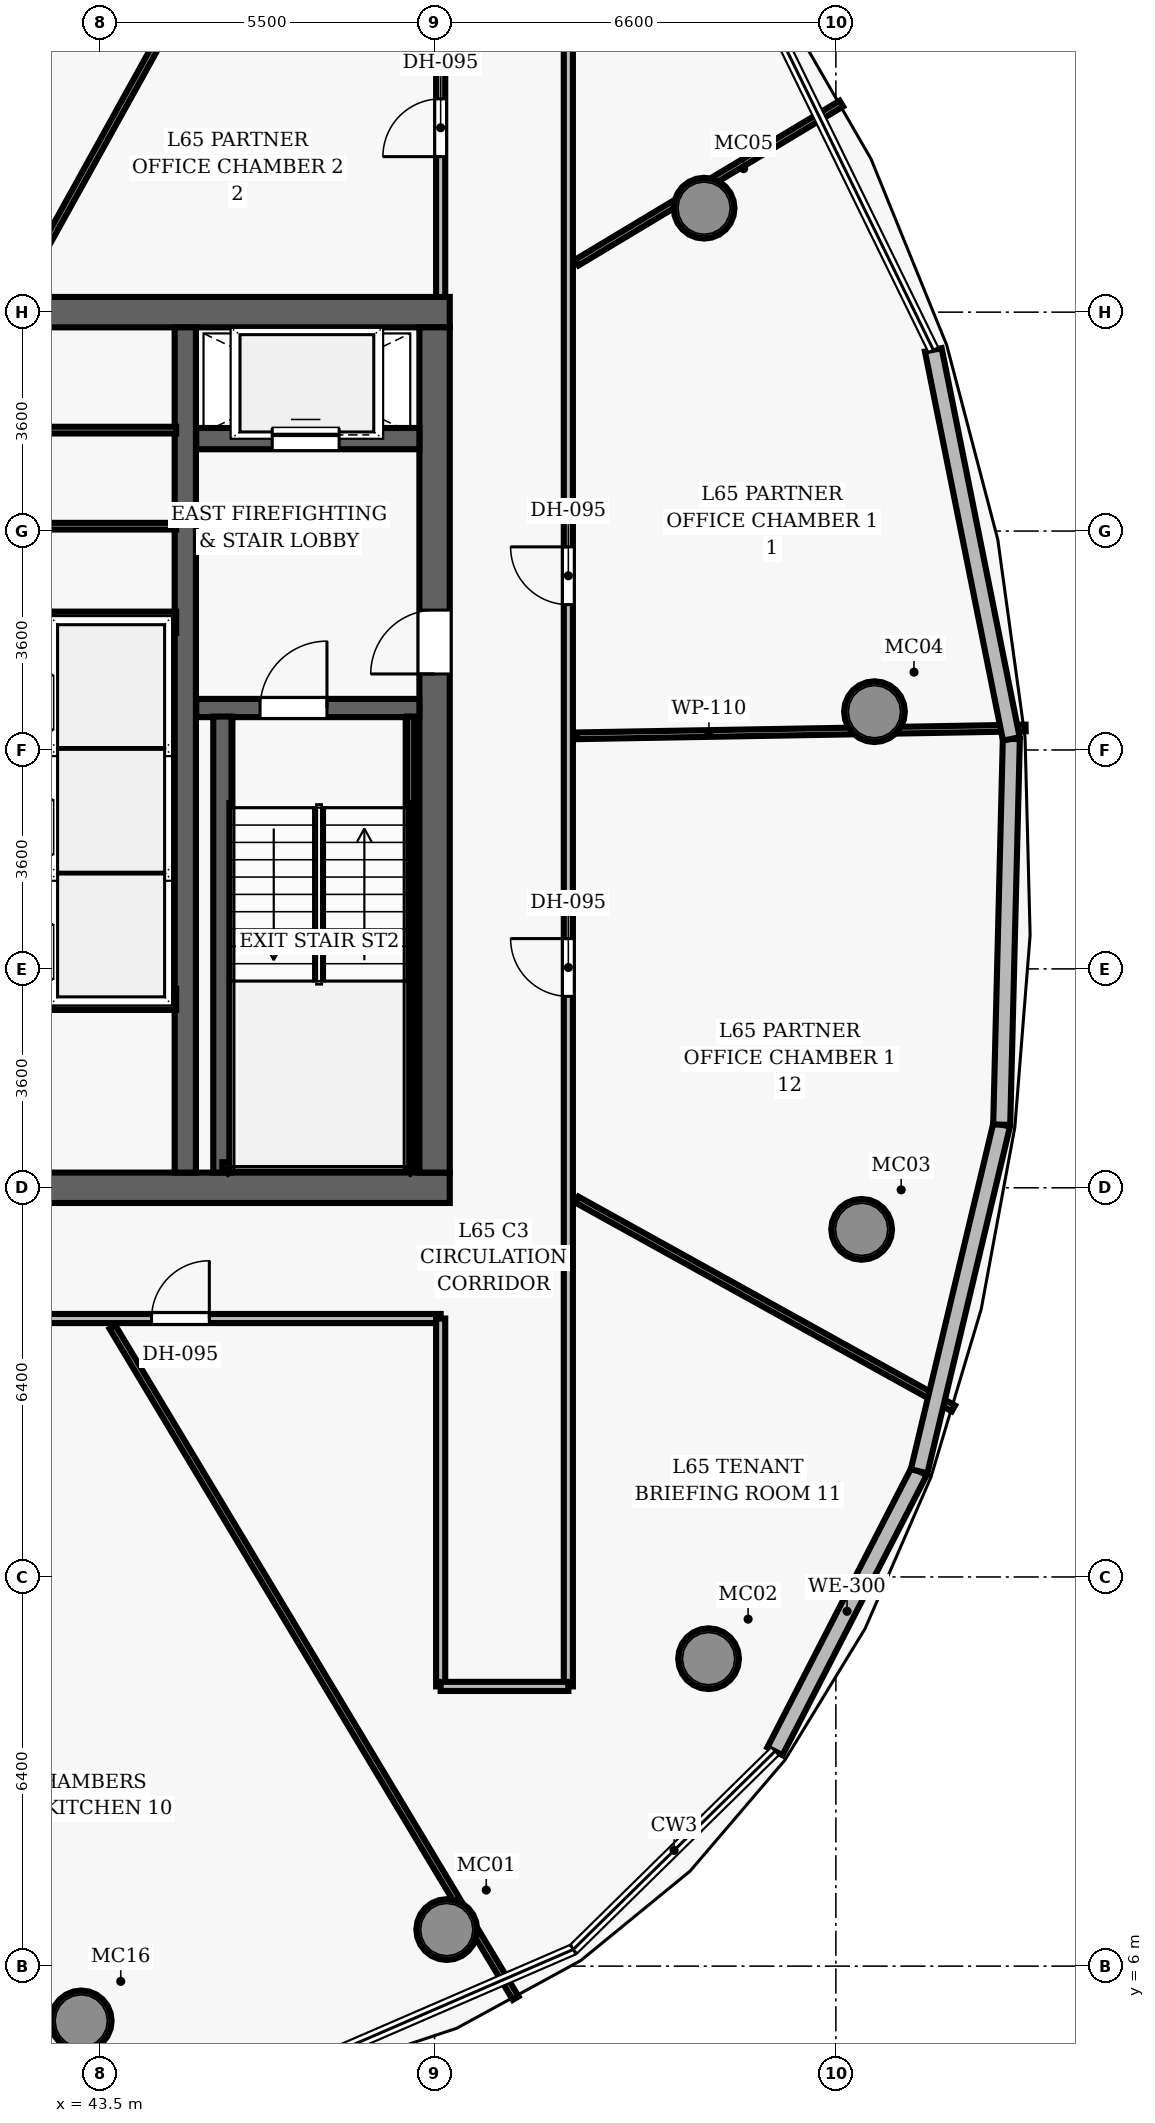
"""IFC4 building model, lengths in metres.
Left out: names, types, materials, properties, quantities, classifications, styles, units other than length and angle.
Written with IfcOpenShell. Run it as: python <this file> out.ifc"""

import sys

from ifc_helpers import new_model, si_unit, direction, frame, frame_2d, origin, origin_2d, place, context, subcontext, project, spatial, rectangle, hollow_circle, extrude, element, fill, save


model = new_model("IFC4")
c1 = context("Model", 3, precision=1e-05, world=origin(), true_north=direction((0.0, 1.0)))
c2 = subcontext(c1, "Body", "Model", "MODEL_VIEW")
j1 = project(units=[si_unit("LENGTHUNIT", "METRE"), si_unit("PLANEANGLEUNIT", "RADIAN")], contexts=[c1])
p1 = place(None, origin())
s1 = spatial("IfcSite", under=j1, at=p1, CompositionType="ELEMENT")
p2 = place(p1, origin())
s2 = spatial("IfcBuilding", under=s1, at=p2, CompositionType="ELEMENT")
p3 = place(p2, frame((0.0, 0.0, 257.45)))
s3 = spatial("IfcBuildingStorey", under=s2, at=p3, CompositionType="ELEMENT", Elevation=257.45)
p4 = place(p3, frame((26.75, 18.8, 0.0), z_axis=(0.0, 0.0, 1.0), x_axis=(1.0, 0.0, 0.0)))
e1 = element("IfcWall", 1, at=p4, inside=s3, PredefinedType="SHEAR", context=c2, shape_type="SweptSolid", body=[
    extrude(rectangle(XDim=22.5, YDim=0.5, at=frame_2d((11.25, 0.0))), origin(), (0.0, 0.0, 1.0), 3.85),
])
p5 = place(p4, frame((14.47, 0.0, 0.0)))
e2 = element("IfcOpeningElement", 2, at=p5, cuts=e1, PredefinedType="OPENING", context=c2, shape_type="SweptSolid", body=[
    extrude(rectangle(XDim=1.05, YDim=2.15, at=frame_2d((0.525, 1.075))), frame((0.0, 0.26, 0.0), z_axis=(0.0, -1.0, 0.0), x_axis=(1.0, 0.0, 0.0)), (0.0, 0.0, 1.0), 0.52),
])
p6 = place(p3, frame((26.75, 33.2, 0.0), z_axis=(0.0, 0.0, 1.0), x_axis=(1.0, 0.0, 0.0)))
e3 = element("IfcWall", 3, at=p6, inside=s3, PredefinedType="SHEAR", context=c2, shape_type="SweptSolid", body=[
    extrude(rectangle(XDim=22.5, YDim=0.5, at=frame_2d((11.25, 0.0))), origin(), (0.0, 0.0, 1.0), 3.85),
])
p7 = place(p3, frame((49.0, 19.05, 0.0), z_axis=(0.0, 0.0, 1.0), x_axis=(0.0, 1.0, 0.0)))
e4 = element("IfcWall", 4, at=p7, inside=s3, PredefinedType="SHEAR", context=c2, shape_type="SweptSolid", body=[
    extrude(rectangle(XDim=13.9, YDim=0.5, at=frame_2d((6.95, 0.0))), origin(), (0.0, 0.0, 1.0), 3.85),
])
p8 = place(p7, frame((8.2, 0.0, 0.0)))
e5 = element("IfcOpeningElement", 5, at=p8, cuts=e4, PredefinedType="OPENING", context=c2, shape_type="SweptSolid", body=[
    extrude(rectangle(XDim=1.05, YDim=2.15, at=frame_2d((0.525, 1.075))), frame((0.0, 0.26, 0.0), z_axis=(0.0, -1.0, 0.0), x_axis=(1.0, 0.0, 0.0)), (0.0, 0.0, 1.0), 0.52),
])
p9 = place(p3, frame((44.9, 19.05, 0.0), z_axis=(0.0, 0.0, 1.0), x_axis=(0.0, 1.0, 0.0)))
e6 = element("IfcWall", 6, at=p9, inside=s3, PredefinedType="SHEAR", context=c2, shape_type="SweptSolid", body=[
    extrude(rectangle(XDim=13.9, YDim=0.35, at=frame_2d((6.95, 0.0))), origin(), (0.0, 0.0, 1.0), 3.85),
])
for number, where, z_axis, x_axis in (
    (7, (49.2, 6.601, 0.0), (0.0, 0.0, 1.0), (1.0, 0.0, 0.0)),
    (8, (53.506, 11.056, 0.0), (0.0, 0.0, 1.0), (1.0, 0.0, 0.0)),
    (9, (56.024, 18.116, 0.0), (0.0, 0.0, 1.0), (1.0, 0.0, 0.0)),
    (10, (56.235, 26.629, 0.0), (0.0, 0.0, 1.0), (1.0, 0.0, 0.0)),
    (11, (53.433, 34.91, 0.0), (0.0, 0.0, 1.0), (1.0, 0.0, 0.0)),
    (12, (43.188, 5.099, 0.0), (0.0, 0.0, 1.0), (1.0, 0.0, 0.0)),
):
    element("IfcColumn", number, at=place(p3, frame(where, z_axis=z_axis, x_axis=x_axis)), inside=s3, PredefinedType="COLUMN", context=c2, shape_type="SweptSolid", body=[
        extrude(hollow_circle(Radius=0.5, WallThickness=0.045, at=origin_2d()), origin(), (0.0, 0.0, 1.0), 3.85),
    ])
p10 = place(p3, frame((45.08, 26.69, 0.0), z_axis=(0.0, 0.0, 1.0), x_axis=(1.0, 0.0, 0.0)))
e13 = element("IfcWall", 13, at=p10, inside=s3, PredefinedType="SHEAR", context=c2, shape_type="SweptSolid", body=[
    extrude(rectangle(XDim=3.67, YDim=0.3, at=frame_2d((1.835, 0.0))), origin(), (0.0, 0.0, 1.0), 3.85),
])
p11 = place(p10, frame((1.05, 0.0, 0.0)))
e14 = element("IfcOpeningElement", 14, at=p11, cuts=e13, PredefinedType="OPENING", context=c2, shape_type="SweptSolid", body=[
    extrude(rectangle(XDim=1.1, YDim=2.15, at=frame_2d((0.55, 1.075))), frame((0.0, 0.16, 0.0), z_axis=(0.0, -1.0, 0.0), x_axis=(1.0, 0.0, 0.0)), (0.0, 0.0, 1.0), 0.32),
])
p12 = place(p3, frame((45.51, 19.05, 0.0), z_axis=(0.0, 0.0, 1.0), x_axis=(0.0, 1.0, 0.0)))
e15 = element("IfcWall", 15, at=p12, inside=s3, PredefinedType="SHEAR", context=c2, shape_type="SweptSolid", body=[
    extrude(rectangle(XDim=7.5, YDim=0.3, at=frame_2d((3.75, 0.0))), origin(), (0.0, 0.0, 1.0), 3.85),
])
p13 = place(p3, frame((48.605, 19.1, 0.0), z_axis=(0.0, 0.0, 1.0), x_axis=(0.0, 1.0, 0.0)))
e16 = element("IfcWall", 16, at=p13, inside=s3, PredefinedType="SHEAR", context=c2, shape_type="SweptSolid", body=[
    extrude(rectangle(XDim=7.45, YDim=0.12, at=frame_2d((3.725, 0.0))), origin(), (0.0, 0.0, 1.0), 3.85),
])
p14 = place(p3, frame((45.51, 19.16, 0.0), z_axis=(0.0, 0.0, 1.0), x_axis=(1.0, 0.0, 0.0)))
e17 = element("IfcWall", 17, at=p14, inside=s3, PredefinedType="SHEAR", context=c2, shape_type="SweptSolid", body=[
    extrude(rectangle(XDim=3.095, YDim=0.12, at=frame_2d((1.547, 0.0))), origin(), (0.0, 0.0, 1.0), 3.85),
])
p15 = place(p3, frame((45.08, 31.12, 0.0), z_axis=(0.0, 0.0, 1.0), x_axis=(1.0, 0.0, 0.0)))
e18 = element("IfcWall", 18, at=p15, inside=s3, PredefinedType="SHEAR", context=c2, shape_type="SweptSolid", body=[
    extrude(rectangle(XDim=3.67, YDim=0.35, at=frame_2d((1.835, 0.0))), origin(), (0.0, 0.0, 1.0), 3.04),
])
p16 = place(p15, frame((1.25, 0.0, 0.0)))
e19 = element("IfcOpeningElement", 19, at=p16, cuts=e18, PredefinedType="OPENING", context=c2, shape_type="SweptSolid", body=[
    extrude(rectangle(XDim=1.1, YDim=2.15, at=frame_2d((0.55, 1.075))), frame((0.0, 0.185, 0.0), z_axis=(0.0, -1.0, 0.0), x_axis=(1.0, 0.0, 0.0)), (0.0, 0.0, 1.0), 0.37),
])
p17 = place(p3, frame((42.55, 21.73, 0.0), z_axis=(0.0, 0.0, 1.0), x_axis=(0.0, 1.0, 0.0)))
e20 = element("IfcWall", 20, at=p17, inside=s3, PredefinedType="SHEAR", context=c2, shape_type="SweptSolid", body=[
    extrude(rectangle(XDim=6.54, YDim=0.35, at=frame_2d((3.27, 0.0))), origin(), (0.0, 0.0, 1.0), 3.04),
])
p18 = place(p17, frame((0.5, 0.0, 0.0)))
e21 = element("IfcOpeningElement", 21, at=p18, cuts=e20, PredefinedType="OPENING", context=c2, shape_type="SweptSolid", body=[
    extrude(rectangle(XDim=0.9, YDim=2.15, at=frame_2d((0.45, 1.075))), frame((0.0, 0.185, 0.0), z_axis=(0.0, -1.0, 0.0), x_axis=(1.0, 0.0, 0.0)), (0.0, 0.0, 1.0), 0.37),
])
p19 = place(p17, frame((2.55, 0.0, 0.0)))
e22 = element("IfcOpeningElement", 22, at=p19, cuts=e20, PredefinedType="OPENING", context=c2, shape_type="SweptSolid", body=[
    extrude(rectangle(XDim=0.9, YDim=2.15, at=frame_2d((0.45, 1.075))), frame((0.0, 0.185, 0.0), z_axis=(0.0, -1.0, 0.0), x_axis=(1.0, 0.0, 0.0)), (0.0, 0.0, 1.0), 0.37),
])
p20 = place(p17, frame((4.6, 0.0, 0.0)))
e23 = element("IfcOpeningElement", 23, at=p20, cuts=e20, PredefinedType="OPENING", context=c2, shape_type="SweptSolid", body=[
    extrude(rectangle(XDim=0.9, YDim=2.15, at=frame_2d((0.45, 1.075))), frame((0.0, 0.185, 0.0), z_axis=(0.0, -1.0, 0.0), x_axis=(1.0, 0.0, 0.0)), (0.0, 0.0, 1.0), 0.37),
])
for number, where, z_axis, x_axis in (
    (24, (42.72, 21.9, 0.0), (0.0, 0.0, 1.0), (1.0, 0.0, 0.0)),
    (25, (42.72, 28.1, 0.0), (0.0, 0.0, 1.0), (1.0, 0.0, 0.0)),
):
    element("IfcWall", number, at=place(p3, frame(where, z_axis=z_axis, x_axis=x_axis)), inside=s3, PredefinedType="SHEAR", context=c2, shape_type="SweptSolid", body=[
        extrude(rectangle(XDim=2.03, YDim=0.35, at=frame_2d((1.015, 0.0))), origin(), (0.0, 0.0, 1.0), 3.04),
    ])
for number, where, z_axis, x_axis in (
    (26, (42.55, 29.68, 0.0), (0.0, 0.0, 1.0), (1.0, 0.0, 0.0)),
    (27, (42.55, 31.26, 0.0), (0.0, 0.0, 1.0), (1.0, 0.0, 0.0)),
):
    element("IfcWall", number, at=place(p3, frame(where, z_axis=z_axis, x_axis=x_axis)), inside=s3, PredefinedType="PARTITIONING", context=c2, shape_type="SweptSolid", body=[
        extrude(rectangle(XDim=2.2, YDim=0.11, at=frame_2d((1.1, 0.0))), origin(), (0.0, 0.0, 1.0), 3.04),
    ])
p21 = place(p3, frame((26.9, 16.65, 0.0), z_axis=(0.0, 0.0, 1.0), x_axis=(1.0, 0.0, 0.0)))
e28 = element("IfcWall", 28, at=p21, inside=s3, PredefinedType="PARTITIONING", context=c2, shape_type="SweptSolid", body=[
    extrude(rectangle(XDim=22.2, YDim=0.15, at=frame_2d((11.1, 0.0))), origin(), (0.0, 0.0, 1.0), 3.04),
])
p22 = place(p21, frame((4.135, 0.0, 0.0)))
e29 = element("IfcOpeningElement", 29, at=p22, cuts=e28, PredefinedType="OPENING", context=c2, shape_type="SweptSolid", body=[
    extrude(rectangle(XDim=0.95, YDim=2.15, at=frame_2d((0.475, 1.075))), frame((0.0, 0.085, 0.0), z_axis=(0.0, -1.0, 0.0), x_axis=(1.0, 0.0, 0.0)), (0.0, 0.0, 1.0), 0.17),
])
p23 = place(p21, frame((9.584, 0.0, 0.0)))
e30 = element("IfcOpeningElement", 30, at=p23, cuts=e28, PredefinedType="OPENING", context=c2, shape_type="SweptSolid", body=[
    extrude(rectangle(XDim=0.95, YDim=2.15, at=frame_2d((0.475, 1.075))), frame((0.0, 0.085, 0.0), z_axis=(0.0, -1.0, 0.0), x_axis=(1.0, 0.0, 0.0)), (0.0, 0.0, 1.0), 0.17),
])
p24 = place(p21, frame((14.473, 0.0, 0.0)))
e31 = element("IfcOpeningElement", 31, at=p24, cuts=e28, PredefinedType="OPENING", context=c2, shape_type="SweptSolid", body=[
    extrude(rectangle(XDim=0.95, YDim=2.15, at=frame_2d((0.475, 1.075))), frame((0.0, 0.085, 0.0), z_axis=(0.0, -1.0, 0.0), x_axis=(1.0, 0.0, 0.0)), (0.0, 0.0, 1.0), 0.17),
])
p25 = place(p21, frame((17.445, 0.0, 0.0)))
e32 = element("IfcOpeningElement", 32, at=p25, cuts=e28, PredefinedType="OPENING", context=c2, shape_type="SweptSolid", body=[
    extrude(rectangle(XDim=0.95, YDim=2.15, at=frame_2d((0.475, 1.075))), frame((0.0, 0.085, 0.0), z_axis=(0.0, -1.0, 0.0), x_axis=(1.0, 0.0, 0.0)), (0.0, 0.0, 1.0), 0.17),
])
p26 = place(p3, frame((51.2, 10.6, 0.0), z_axis=(0.0, 0.0, 1.0), x_axis=(0.0, 1.0, 0.0)))
e33 = element("IfcWall", 33, at=p26, inside=s3, PredefinedType="PARTITIONING", context=c2, shape_type="SweptSolid", body=[
    extrude(rectangle(XDim=30.8, YDim=0.15, at=frame_2d((15.4, 0.0))), origin(), (0.0, 0.0, 1.0), 3.04),
])
p27 = place(p26, frame((17.79, 0.0, 0.0)))
e34 = element("IfcOpeningElement", 34, at=p27, cuts=e33, PredefinedType="OPENING", context=c2, shape_type="SweptSolid", body=[
    extrude(rectangle(XDim=0.95, YDim=2.15, at=frame_2d((0.475, 1.075))), frame((0.0, 0.085, 0.0), z_axis=(0.0, -1.0, 0.0), x_axis=(1.0, 0.0, 0.0)), (0.0, 0.0, 1.0), 0.17),
])
p28 = place(p26, frame((11.348, 0.0, 0.0)))
e35 = element("IfcOpeningElement", 35, at=p28, cuts=e33, PredefinedType="OPENING", context=c2, shape_type="SweptSolid", body=[
    extrude(rectangle(XDim=0.95, YDim=2.15, at=frame_2d((0.475, 1.075))), frame((0.0, 0.085, 0.0), z_axis=(0.0, -1.0, 0.0), x_axis=(1.0, 0.0, 0.0)), (0.0, 0.0, 1.0), 0.17),
])
p29 = place(p3, frame((49.1, 10.6, 0.0), z_axis=(0.0, 0.0, 1.0), x_axis=(0.0, 1.0, 0.0)))
e36 = element("IfcWall", 36, at=p29, inside=s3, PredefinedType="PARTITIONING", context=c2, shape_type="SweptSolid", body=[
    extrude(rectangle(XDim=6.05, YDim=0.15, at=frame_2d((3.025, 0.0))), origin(), (0.0, 0.0, 1.0), 3.04),
])
p30 = place(p3, frame((49.1, 33.45, 0.0), z_axis=(0.0, 0.0, 1.0), x_axis=(0.0, 1.0, 0.0)))
e37 = element("IfcWall", 37, at=p30, inside=s3, PredefinedType="PARTITIONING", context=c2, shape_type="SweptSolid", body=[
    extrude(rectangle(XDim=7.95, YDim=0.15, at=frame_2d((3.975, 0.0))), origin(), (0.0, 0.0, 1.0), 3.04),
])
p31 = place(p30, frame((2.308, 0.0, 0.0)))
e38 = element("IfcOpeningElement", 38, at=p31, cuts=e37, PredefinedType="OPENING", context=c2, shape_type="SweptSolid", body=[
    extrude(rectangle(XDim=0.95, YDim=2.15, at=frame_2d((0.475, 1.075))), frame((0.0, 0.085, 0.0), z_axis=(0.0, -1.0, 0.0), x_axis=(1.0, 0.0, 0.0)), (0.0, 0.0, 1.0), 0.17),
])
p32 = place(p3, frame((49.1, 10.6, 0.0), z_axis=(0.0, 0.0, 1.0), x_axis=(1.0, 0.0, 0.0)))
e39 = element("IfcWall", 39, at=p32, inside=s3, PredefinedType="PARTITIONING", context=c2, shape_type="SweptSolid", body=[
    extrude(rectangle(XDim=2.1, YDim=0.15, at=frame_2d((1.05, 0.0))), origin(), (0.0, 0.0, 1.0), 3.04),
])
p33 = place(p3, frame((51.34, 26.233, 0.0), z_axis=(0.0, 0.0, 1.0), x_axis=(0.999847502683, 0.017463429752, 0.0)))
e40 = element("IfcWall", 40, at=p33, inside=s3, PredefinedType="PARTITIONING", context=c2, shape_type="SweptSolid", body=[
    extrude(rectangle(XDim=7.382, YDim=0.11, at=frame_2d((3.691, 0.0))), origin(), (0.0, 0.0, 1.0), 3.04),
])
p34 = place(p3, frame((51.34, 34.015, 0.0), z_axis=(0.0, 0.0, 1.0), x_axis=(0.857148919357, 0.515068665369, 0.0)))
e41 = element("IfcWall", 41, at=p34, inside=s3, PredefinedType="PARTITIONING", context=c2, shape_type="SweptSolid", body=[
    extrude(rectangle(XDim=5.075, YDim=0.11, at=frame_2d((2.538, 0.0))), origin(), (0.0, 0.0, 1.0), 3.04),
])
p35 = place(p3, frame((42.141, 33.47, 0.0), z_axis=(0.0, 0.0, 1.0), x_axis=(0.484814100985, 0.87461722341, 0.0)))
e42 = element("IfcWall", 42, at=p35, inside=s3, PredefinedType="PARTITIONING", context=c2, shape_type="SweptSolid", body=[
    extrude(rectangle(XDim=12.958, YDim=0.11, at=frame_2d((6.479, 0.0))), origin(), (0.0, 0.0, 1.0), 3.04),
])
p36 = place(p3, frame((43.702, 16.51, 0.0), z_axis=(0.0, 0.0, 1.0), x_axis=(0.515031037402, -0.857171529224, 0.0)))
e43 = element("IfcWall", 43, at=p36, inside=s3, PredefinedType="PARTITIONING", context=c2, shape_type="SweptSolid", body=[
    extrude(rectangle(XDim=12.876, YDim=0.11, at=frame_2d((6.438, 0.0))), origin(), (0.0, 0.0, 1.0), 3.04),
])
p37 = place(p3, frame((51.34, 18.605, 0.0), z_axis=(0.0, 0.0, 1.0), x_axis=(0.874620424882, -0.484808325403, 0.0)))
e44 = element("IfcWall", 44, at=p37, inside=s3, PredefinedType="PARTITIONING", context=c2, shape_type="SweptSolid", body=[
    extrude(rectangle(XDim=7.08, YDim=0.11, at=frame_2d((3.54, 0.0))), origin(), (0.0, 0.0, 1.0), 3.04),
])
p38 = place(p3, frame((56.969, 14.138, 0.0), z_axis=(0.0, 0.0, 1.0), x_axis=(-0.457797416995, -0.889056536443, 0.0)))
e45 = element("IfcWall", 45, at=p38, inside=s3, PredefinedType="SOLIDWALL", context=c2, shape_type="SweptSolid", body=[
    extrude(rectangle(XDim=5.179, YDim=0.28, at=frame_2d((2.59, 0.0))), origin(), (0.0, 0.0, 1.0), 3.625),
])
p39 = place(p3, frame((58.327, 19.838, 0.0), z_axis=(0.0, 0.0, 1.0), x_axis=(-0.231855210835, -0.97275030774, 0.0)))
e46 = element("IfcWall", 46, at=p39, inside=s3, PredefinedType="SOLIDWALL", context=c2, shape_type="SweptSolid", body=[
    extrude(rectangle(XDim=5.86, YDim=0.28, at=frame_2d((2.93, 0.0))), origin(), (0.0, 0.0, 1.0), 3.625),
])
p40 = place(p3, frame((58.486, 26.181, 0.0), z_axis=(0.0, 0.0, 1.0), x_axis=(-0.024932590226, -0.999689134654, 0.0)))
e47 = element("IfcWall", 47, at=p40, inside=s3, PredefinedType="SOLIDWALL", context=c2, shape_type="SweptSolid", body=[
    extrude(rectangle(XDim=6.345, YDim=0.28, at=frame_2d((3.173, 0.0))), origin(), (0.0, 0.0, 1.0), 3.625),
])
p41 = place(p3, frame((57.202, 32.58, 0.0), z_axis=(0.0, 0.0, 1.0), x_axis=(0.196662861998, -0.98047117179, 0.0)))
e48 = element("IfcWall", 48, at=p41, inside=s3, PredefinedType="SOLIDWALL", context=c2, shape_type="SweptSolid", body=[
    extrude(rectangle(XDim=6.526, YDim=0.28, at=frame_2d((3.263, 0.0))), origin(), (0.0, 0.0, 1.0), 3.625),
])
p42 = place(p11, origin())
e49 = element("IfcDoor", 49, at=p42, inside=s3, OperationType="SINGLE_SWING_RIGHT", PredefinedType="DOOR", context=c2, shape_type="SweptSolid", body=[
    extrude(rectangle(XDim=1.1, YDim=2.15, at=frame_2d((0.55, 1.075))), frame((0.0, 0.025, 0.0), z_axis=(0.0, -1.0, 0.0), x_axis=(1.0, 0.0, 0.0)), (0.0, 0.0, 1.0), 0.05),
])
fill(e14, e49)
p43 = place(p8, origin())
e50 = element("IfcDoor", 50, at=p43, inside=s3, OperationType="SINGLE_SWING_LEFT", PredefinedType="DOOR", context=c2, shape_type="SweptSolid", body=[
    extrude(rectangle(XDim=1.05, YDim=2.15, at=frame_2d((0.525, 1.075))), frame((0.0, 0.025, 0.0), z_axis=(0.0, -1.0, 0.0), x_axis=(1.0, 0.0, 0.0)), (0.0, 0.0, 1.0), 0.05),
])
fill(e5, e50)
p44 = place(p27, origin())
e51 = element("IfcDoor", 51, at=p44, inside=s3, OperationType="SINGLE_SWING_RIGHT", PredefinedType="DOOR", context=c2, shape_type="SweptSolid", body=[
    extrude(rectangle(XDim=0.95, YDim=2.15, at=frame_2d((0.475, 1.075))), frame((0.0, 0.025, 0.0), z_axis=(0.0, -1.0, 0.0), x_axis=(1.0, 0.0, 0.0)), (0.0, 0.0, 1.0), 0.05),
])
fill(e34, e51)
p45 = place(p31, origin())
e52 = element("IfcDoor", 52, at=p45, inside=s3, OperationType="SINGLE_SWING_LEFT", PredefinedType="DOOR", context=c2, shape_type="SweptSolid", body=[
    extrude(rectangle(XDim=0.95, YDim=2.15, at=frame_2d((0.475, 1.075))), frame((0.0, 0.025, 0.0), z_axis=(0.0, -1.0, 0.0), x_axis=(1.0, 0.0, 0.0)), (0.0, 0.0, 1.0), 0.05),
])
fill(e38, e52)
p46 = place(p25, origin())
e53 = element("IfcDoor", 53, at=p46, inside=s3, OperationType="SINGLE_SWING_RIGHT", PredefinedType="DOOR", context=c2, shape_type="SweptSolid", body=[
    extrude(rectangle(XDim=0.95, YDim=2.15, at=frame_2d((0.475, 1.075))), frame((0.0, 0.025, 0.0), z_axis=(0.0, -1.0, 0.0), x_axis=(1.0, 0.0, 0.0)), (0.0, 0.0, 1.0), 0.05),
])
fill(e32, e53)
p47 = place(p28, origin())
e54 = element("IfcDoor", 54, at=p47, inside=s3, OperationType="SINGLE_SWING_RIGHT", PredefinedType="DOOR", context=c2, shape_type="SweptSolid", body=[
    extrude(rectangle(XDim=0.95, YDim=2.15, at=frame_2d((0.475, 1.075))), frame((0.0, 0.025, 0.0), z_axis=(0.0, -1.0, 0.0), x_axis=(1.0, 0.0, 0.0)), (0.0, 0.0, 1.0), 0.05),
])
fill(e35, e54)
p48 = place(p16, origin())
e55 = element("IfcDoor", 55, at=p48, inside=s3, OperationType="SLIDING_TO_LEFT", PredefinedType="DOOR", context=c2, shape_type="SweptSolid", body=[
    extrude(rectangle(XDim=1.1, YDim=2.15, at=frame_2d((0.55, 1.075))), frame((0.0, 0.025, 0.0), z_axis=(0.0, -1.0, 0.0), x_axis=(1.0, 0.0, 0.0)), (0.0, 0.0, 1.0), 0.05),
])
fill(e19, e55)
save(model, sys.argv[1])
